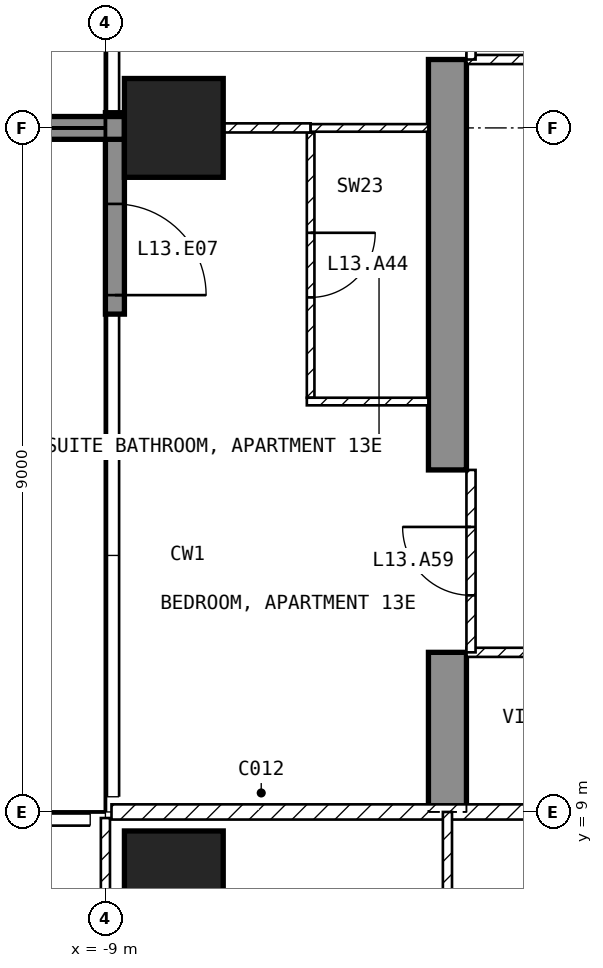
"""IFC4 building model, lengths in metres.
Left out: names, types, materials, properties, quantities, classifications, styles, units other than length and angle.
Written with IfcOpenShell. Run it as: python <this file> out.ifc"""

import sys

from ifc_helpers import new_model, si_unit, direction, frame, frame_2d, origin, origin_2d, place, context, subcontext, project, spatial, polyline, rectangle, outline, extrude, element, fill, save


model = new_model("IFC4")
c1 = context("Model", 3, precision=1e-05, world=origin(), true_north=direction((0.0, 1.0)))
c2 = subcontext(c1, "Body", "Model", "MODEL_VIEW")
j1 = project(units=[si_unit("LENGTHUNIT", "METRE"), si_unit("PLANEANGLEUNIT", "RADIAN")], contexts=[c1])
p1 = place(None, origin())
s1 = spatial("IfcSite", under=j1, at=p1, CompositionType="ELEMENT")
p2 = place(p1, origin())
s2 = spatial("IfcBuilding", under=s1, at=p2, CompositionType="ELEMENT")
p3 = place(p2, frame((0.0, 0.0, 64.5)))
s3 = spatial("IfcBuildingStorey", under=s2, at=p3, CompositionType="ELEMENT", Elevation=64.5)
for number, where, z_axis, x_axis in (
    (1, (-8.1, 8.1, -0.25), (0.0, 0.0, 1.0), (1.0, 0.0, 0.0)),
    (2, (-8.1, 18.0, -0.25), (0.0, 0.0, 1.0), (1.0, 0.0, 0.0)),
):
    element("IfcColumn", number, at=place(p3, frame(where, z_axis=z_axis, x_axis=x_axis)), inside=s3, PredefinedType="COLUMN", context=c2, shape_type="SweptSolid", body=[
        extrude(rectangle(XDim=1.3, YDim=1.3, at=origin_2d()), origin(), (0.0, 0.0, 1.0), 3.5),
    ])
p4 = place(p3, frame((-4.75, 9.0, -0.25), z_axis=(1.0, 0.0, 0.0), x_axis=(0.0, 1.0, 0.0)))
e3 = element("IfcWall", 3, at=p4, inside=s3, PredefinedType="SHEAR", context=c2, shape_type="SweptSolid", body=[
    extrude(outline(polyline([(0.0, 0.0), (2.1, 0.0), (2.1, 2.65), (4.5, 2.65), (4.5, 0.0), (9.9, 0.0), (9.9, 2.65), (12.3, 2.65), (12.3, 0.0), (16.45, 0.0), (16.45, 3.5), (0.0, 3.5), (0.0, 0.0)])), origin(), (0.0, 0.0, 1.0), 0.5),
])
p5 = place(p3, frame((-8.875, 18.2, 0.0), z_axis=(0.0, 0.0, 1.0), x_axis=(0.0, -1.0, 0.0)))
e4 = element("IfcWall", 4, at=p5, inside=s3, PredefinedType="SOLIDWALL", context=c2, shape_type="SweptSolid", body=[
    extrude(rectangle(XDim=2.65, YDim=0.25, at=frame_2d((1.325, 0.0))), origin(), (0.0, 0.0, 1.0), 3.25),
])
p6 = place(p5, frame((1.2, 0.0, 0.0)))
e5 = element("IfcOpeningElement", 5, at=p6, cuts=e4, PredefinedType="OPENING", context=c2, shape_type="SweptSolid", body=[
    extrude(rectangle(XDim=1.2, YDim=2.4, at=frame_2d((0.6, 1.2))), frame((0.0, 0.135, 0.0), z_axis=(0.0, -1.0, 0.0), x_axis=(1.0, 0.0, 0.0)), (0.0, 0.0, 1.0), 0.27),
])
p7 = place(p3, frame((-8.75, 18.0, 0.0), z_axis=(0.0, 0.0, 1.0), x_axis=(-1.0, 0.0, 0.0)))
e6 = element("IfcWall", 6, at=p7, inside=s3, PredefinedType="SOLIDWALL", context=c2, shape_type="SweptSolid", body=[
    extrude(rectangle(XDim=2.95, YDim=0.3, at=frame_2d((1.475, 0.0))), origin(), (0.0, 0.0, 1.0), 3.25),
])
p8 = place(p3, frame((-8.92, 9.0, 0.0), z_axis=(0.0, 0.0, 1.0), x_axis=(1.0, 0.0, 0.0)))
e7 = element("IfcWall", 7, at=p8, inside=s3, PredefinedType="PARTITIONING", context=c2, shape_type="SweptSolid", body=[
    extrude(rectangle(XDim=17.84, YDim=0.2, at=frame_2d((8.92, 0.0))), origin(), (0.0, 0.0, 1.0), 3.25),
])
p9 = place(p8, frame((8.42, 0.0, 0.0)))
e8 = element("IfcOpeningElement", 8, at=p9, cuts=e7, PredefinedType="OPENING", context=c2, shape_type="SweptSolid", body=[
    extrude(rectangle(XDim=1.0, YDim=2.1, at=frame_2d((0.5, 1.05))), frame((0.0, 0.11, 0.0), z_axis=(0.0, -1.0, 0.0), x_axis=(1.0, 0.0, 0.0)), (0.0, 0.0, 1.0), 0.22),
])
p10 = place(p3, frame((-9.0, 8.92, 0.0), z_axis=(0.0, 0.0, 1.0), x_axis=(0.0, -1.0, 0.0)))
e9 = element("IfcWall", 9, at=p10, inside=s3, PredefinedType="PARTITIONING", context=c2, shape_type="SweptSolid", body=[
    extrude(rectangle(XDim=7.62, YDim=0.12, at=frame_2d((3.81, 0.0))), origin(), (0.0, 0.0, 1.0), 3.25),
])
p11 = place(p10, frame((5.87, 0.0, 0.0)))
e10 = element("IfcOpeningElement", 10, at=p11, cuts=e9, PredefinedType="OPENING", context=c2, shape_type="SweptSolid", body=[
    extrude(rectangle(XDim=0.9, YDim=2.1, at=frame_2d((0.45, 1.05))), frame((0.0, 0.07, 0.0), z_axis=(0.0, -1.0, 0.0), x_axis=(1.0, 0.0, 0.0)), (0.0, 0.0, 1.0), 0.14),
])
p12 = place(p3, frame((-4.5, 9.0, 0.0), z_axis=(0.0, 0.0, 1.0), x_axis=(0.0, -1.0, 0.0)))
e11 = element("IfcWall", 11, at=p12, inside=s3, PredefinedType="PARTITIONING", context=c2, shape_type="SweptSolid", body=[
    extrude(rectangle(XDim=4.68, YDim=0.12, at=frame_2d((2.34, 0.0))), origin(), (0.0, 0.0, 1.0), 3.25),
])
p13 = place(p12, frame((1.89, 0.0, 0.0)))
e12 = element("IfcOpeningElement", 12, at=p13, cuts=e11, PredefinedType="OPENING", context=c2, shape_type="SweptSolid", body=[
    extrude(rectangle(XDim=0.9, YDim=2.1, at=frame_2d((0.45, 1.05))), frame((0.0, 0.07, 0.0), z_axis=(0.0, -1.0, 0.0), x_axis=(1.0, 0.0, 0.0)), (0.0, 0.0, 1.0), 0.14),
])
p14 = place(p3, frame((-4.25, 11.1, 0.0), z_axis=(0.0, 0.0, 1.0), x_axis=(1.0, 0.0, 0.0)))
e13 = element("IfcWall", 13, at=p14, inside=s3, PredefinedType="PARTITIONING", context=c2, shape_type="SweptSolid", body=[
    extrude(rectangle(XDim=6.35, YDim=0.12, at=frame_2d((3.175, 0.0))), origin(), (0.0, 0.0, 1.0), 3.25),
])
p15 = place(p14, frame((2.725, 0.0, 0.0)))
e14 = element("IfcOpeningElement", 14, at=p15, cuts=e13, PredefinedType="OPENING", context=c2, shape_type="SweptSolid", body=[
    extrude(rectangle(XDim=0.9, YDim=2.1, at=frame_2d((0.45, 1.05))), frame((0.0, 0.07, 0.0), z_axis=(0.0, -1.0, 0.0), x_axis=(1.0, 0.0, 0.0)), (0.0, 0.0, 1.0), 0.14),
])
p16 = place(p3, frame((-4.25, 18.9, 0.0), z_axis=(0.0, 0.0, 1.0), x_axis=(1.0, 0.0, 0.0)))
e15 = element("IfcWall", 15, at=p16, inside=s3, PredefinedType="PARTITIONING", context=c2, shape_type="SweptSolid", body=[
    extrude(rectangle(XDim=8.5, YDim=0.12, at=frame_2d((4.25, 0.0))), origin(), (0.0, 0.0, 1.0), 3.25),
])
p17 = place(p16, frame((1.925, 0.0, 0.0)))
e16 = element("IfcOpeningElement", 16, at=p17, cuts=e15, PredefinedType="OPENING", context=c2, shape_type="SweptSolid", body=[
    extrude(rectangle(XDim=0.9, YDim=2.1, at=frame_2d((0.45, 1.05))), frame((0.0, 0.07, 0.0), z_axis=(0.0, -1.0, 0.0), x_axis=(1.0, 0.0, 0.0)), (0.0, 0.0, 1.0), 0.14),
])
p18 = place(p3, frame((-6.3, 17.94, 0.0), z_axis=(0.0, 0.0, 1.0), x_axis=(0.0, -1.0, 0.0)))
e17 = element("IfcWall", 17, at=p18, inside=s3, PredefinedType="PARTITIONING", context=c2, shape_type="SweptSolid", body=[
    extrude(rectangle(XDim=3.49, YDim=0.1, at=frame_2d((1.745, 0.0))), origin(), (0.0, 0.0, 1.0), 3.25),
])
p19 = place(p18, frame((1.32, 0.0, 0.0)))
e18 = element("IfcOpeningElement", 18, at=p19, cuts=e17, PredefinedType="OPENING", context=c2, shape_type="SweptSolid", body=[
    extrude(rectangle(XDim=0.85, YDim=2.1, at=frame_2d((0.425, 1.05))), frame((0.0, 0.06, 0.0), z_axis=(0.0, -1.0, 0.0), x_axis=(1.0, 0.0, 0.0)), (0.0, 0.0, 1.0), 0.12),
])
p20 = place(p3, frame((-6.35, 14.4, 0.0), z_axis=(0.0, 0.0, 1.0), x_axis=(1.0, 0.0, 0.0)))
e19 = element("IfcWall", 19, at=p20, inside=s3, PredefinedType="PARTITIONING", context=c2, shape_type="SweptSolid", body=[
    extrude(rectangle(XDim=1.6, YDim=0.1, at=frame_2d((0.8, 0.0))), origin(), (0.0, 0.0, 1.0), 3.25),
])
p21 = place(p3, frame((-7.45, 18.0, 0.0), z_axis=(0.0, 0.0, 1.0), x_axis=(1.0, 0.0, 0.0)))
e20 = element("IfcWall", 20, at=p21, inside=s3, PredefinedType="PARTITIONING", context=c2, shape_type="SweptSolid", body=[
    extrude(rectangle(XDim=1.15, YDim=0.12, at=frame_2d((0.575, 0.0))), origin(), (0.0, 0.0, 1.0), 2.346),
])
p22 = place(p3, frame((-6.3, 18.0, 0.0), z_axis=(0.0, 0.0, 1.0), x_axis=(1.0, 0.0, 0.0)))
e21 = element("IfcWall", 21, at=p22, inside=s3, PredefinedType="PARTITIONING", context=c2, shape_type="SweptSolid", body=[
    extrude(rectangle(XDim=1.55, YDim=0.1, at=frame_2d((0.775, 0.0))), origin(), (0.0, 0.0, 1.0), 2.346),
])
p23 = place(p3, frame((-4.19, 11.1, 0.0), z_axis=(0.0, 0.0, 1.0), x_axis=(0.0, 1.0, 0.0)))
e22 = element("IfcWall", 22, at=p23, inside=s3, PredefinedType="PARTITIONING", context=c2, shape_type="SweptSolid", body=[
    extrude(rectangle(XDim=2.4, YDim=0.12, at=frame_2d((1.2, 0.0))), origin(), (0.0, 0.0, 1.0), 2.4),
])
p24 = place(p23, frame((0.75, 0.0, 0.0)))
e23 = element("IfcOpeningElement", 23, at=p24, cuts=e22, PredefinedType="OPENING", context=c2, shape_type="SweptSolid", body=[
    extrude(rectangle(XDim=0.9, YDim=2.1, at=frame_2d((0.45, 1.05))), frame((0.0, 0.07, 0.0), z_axis=(0.0, -1.0, 0.0), x_axis=(1.0, 0.0, 0.0)), (0.0, 0.0, 1.0), 0.14),
])
p25 = place(p3, frame((-4.19, 18.9, 0.0), z_axis=(0.0, 0.0, 1.0), x_axis=(0.0, 1.0, 0.0)))
e24 = element("IfcWall", 24, at=p25, inside=s3, PredefinedType="PARTITIONING", context=c2, shape_type="SweptSolid", body=[
    extrude(rectangle(XDim=2.4, YDim=0.12, at=frame_2d((1.2, 0.0))), origin(), (0.0, 0.0, 1.0), 2.4),
])
p26 = place(p25, frame((0.75, 0.0, 0.0)))
e25 = element("IfcOpeningElement", 25, at=p26, cuts=e24, PredefinedType="OPENING", context=c2, shape_type="SweptSolid", body=[
    extrude(rectangle(XDim=0.9, YDim=2.1, at=frame_2d((0.45, 1.05))), frame((0.0, 0.07, 0.0), z_axis=(0.0, -1.0, 0.0), x_axis=(1.0, 0.0, 0.0)), (0.0, 0.0, 1.0), 0.14),
])
p27 = place(p6, origin())
e26 = element("IfcDoor", 26, at=p27, inside=s3, OperationType="SINGLE_SWING_RIGHT", PredefinedType="DOOR", context=c2, shape_type="SweptSolid", body=[
    extrude(rectangle(XDim=1.2, YDim=2.4, at=frame_2d((0.6, 1.2))), frame((0.0, 0.025, 0.0), z_axis=(0.0, -1.0, 0.0), x_axis=(1.0, 0.0, 0.0)), (0.0, 0.0, 1.0), 0.05),
])
fill(e5, e26)
p28 = place(p19, origin())
e27 = element("IfcDoor", 27, at=p28, inside=s3, OperationType="SINGLE_SWING_LEFT", PredefinedType="DOOR", context=c2, shape_type="SweptSolid", body=[
    extrude(rectangle(XDim=0.85, YDim=2.1, at=frame_2d((0.425, 1.05))), frame((0.0, 0.025, 0.0), z_axis=(0.0, -1.0, 0.0), x_axis=(1.0, 0.0, 0.0)), (0.0, 0.0, 1.0), 0.05),
])
fill(e18, e27)
p29 = place(p24, origin())
e28 = element("IfcDoor", 28, at=p29, inside=s3, OperationType="SINGLE_SWING_RIGHT", PredefinedType="DOOR", context=c2, shape_type="SweptSolid", body=[
    extrude(rectangle(XDim=0.9, YDim=2.1, at=frame_2d((0.45, 1.05))), frame((0.0, 0.025, 0.0), z_axis=(0.0, -1.0, 0.0), x_axis=(1.0, 0.0, 0.0)), (0.0, 0.0, 1.0), 0.05),
])
fill(e23, e28)
save(model, sys.argv[1])
